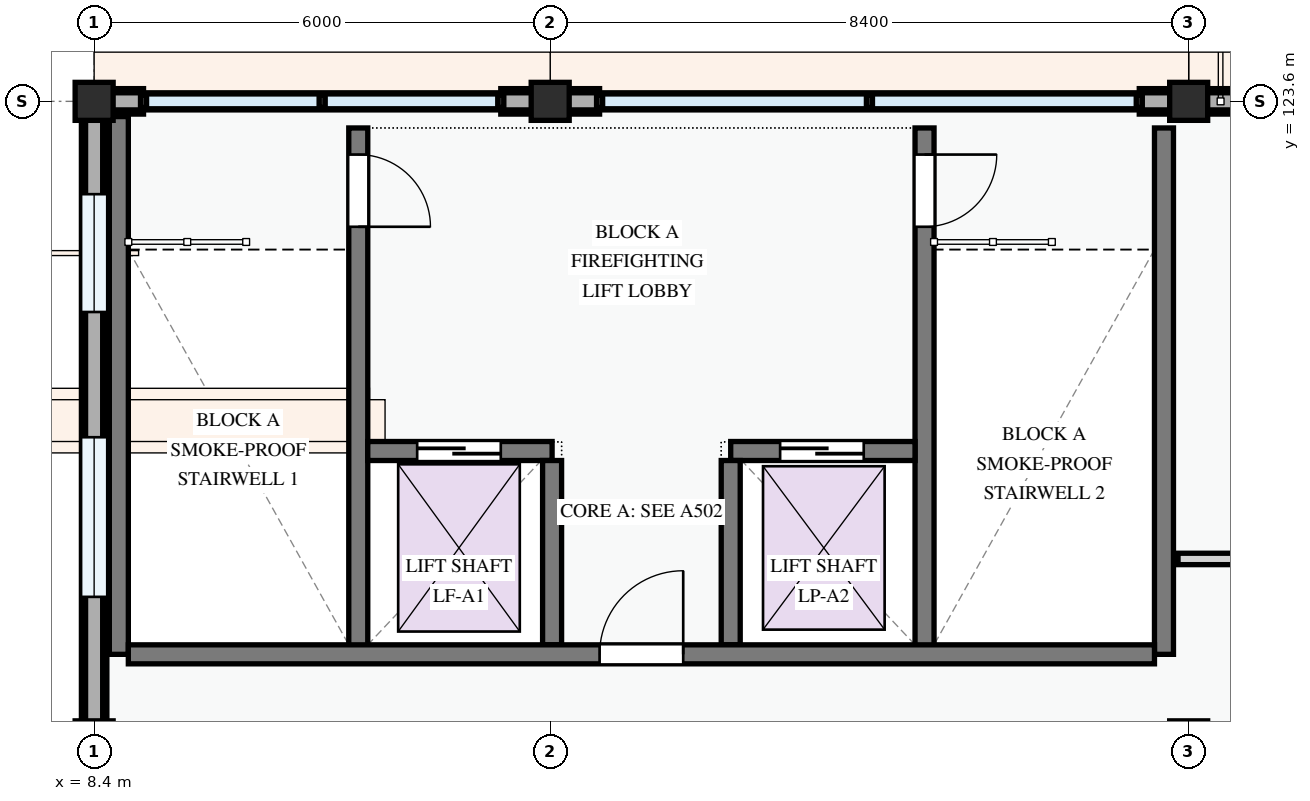
"""IFC4 building model, lengths in metres.
Left out: names, types, materials, properties, quantities, classifications, styles, units other than length and angle.
Written with IfcOpenShell. Run it as: python <this file> out.ifc"""

import sys

from ifc_helpers import new_model, si_unit, direction, frame, frame_2d, origin, origin_2d, place, context, subcontext, project, spatial, polyline, rectangle, outline, extrude, element, fill, save


model = new_model("IFC4")
c1 = context("Model", 3, precision=1e-05, world=origin(), true_north=direction((0.0, 1.0)))
c2 = subcontext(c1, "Body", "Model", "MODEL_VIEW")
j1 = project(units=[si_unit("LENGTHUNIT", "METRE"), si_unit("PLANEANGLEUNIT", "RADIAN")], contexts=[c1])
p1 = place(None, origin())
s1 = spatial("IfcSite", under=j1, at=p1, CompositionType="ELEMENT")
p2 = place(p1, origin())
s2 = spatial("IfcBuilding", under=s1, at=p2, CompositionType="ELEMENT")
p3 = place(p2, frame((0.0, 0.0, 51.0)))
s3 = spatial("IfcBuildingStorey", under=s2, at=p3, CompositionType="ELEMENT", Elevation=51.0)
for number, where, z_axis, x_axis in (
    (1, (8.4, 123.6, 0.0), (0.0, 0.0, 1.0), (1.0, 0.0, 0.0)),
    (2, (14.4, 123.6, 0.0), (0.0, 0.0, 1.0), (1.0, 0.0, 0.0)),
    (3, (22.8, 123.6, 0.0), (0.0, 0.0, 1.0), (1.0, 0.0, 0.0)),
):
    element("IfcColumn", number, at=place(p3, frame(where, z_axis=z_axis, x_axis=x_axis)), inside=s3, PredefinedType="COLUMN", context=c2, shape_type="SweptSolid", body=[
        extrude(rectangle(XDim=0.5, YDim=0.5, at=origin_2d()), origin(), (0.0, 0.0, 1.0), 3.3),
    ])
p4 = place(p3, frame((28.8, 123.6, 0.0), z_axis=(0.0, 0.0, 1.0), x_axis=(-1.0, 0.0, 0.0)))
e4 = element("IfcWall", 4, at=p4, inside=s3, PredefinedType="STANDARD", context=c2, shape_type="SweptSolid", body=[
    extrude(rectangle(XDim=6.0, YDim=0.335, at=frame_2d((3.0, 0.0))), origin(), (0.0, 0.0, 1.0), 2.545),
])
p5 = place(p4, frame((0.62, 0.0, 0.0)))
e5 = element("IfcOpeningElement", 5, at=p5, cuts=e4, PredefinedType="OPENING", context=c2, shape_type="SweptSolid", body=[
    extrude(rectangle(XDim=1.3, YDim=2.15, at=frame_2d((0.65, 1.075))), frame((0.0, 0.177, 0.0), z_axis=(0.0, -1.0, 0.0), x_axis=(1.0, 0.0, 0.0)), (0.0, 0.0, 1.0), 0.355),
])
p6 = place(p4, frame((3.29, 0.0, 0.78)))
e6 = element("IfcOpeningElement", 6, at=p6, cuts=e4, PredefinedType="OPENING", context=c2, shape_type="SweptSolid", body=[
    extrude(rectangle(XDim=1.2, YDim=1.35, at=frame_2d((0.6, 0.675))), frame((0.0, 0.177, 0.0), z_axis=(0.0, -1.0, 0.0), x_axis=(1.0, 0.0, 0.0)), (0.0, 0.0, 1.0), 0.355),
])
for number, where, z_axis, x_axis in (
    (7, (22.8, 123.6, 0.0), (0.0, 0.0, 1.0), (-1.0, 0.0, 0.0)),
    (8, (15.05, 123.6, 0.0), (0.0, 0.0, 1.0), (-1.0, 0.0, 0.0)),
):
    element("IfcWall", number, at=place(p3, frame(where, z_axis=z_axis, x_axis=x_axis)), inside=s3, PredefinedType="STANDARD", context=c2, shape_type="SweptSolid", body=[
        extrude(rectangle(XDim=0.65, YDim=0.335, at=frame_2d((0.325, 0.0))), origin(), (0.0, 0.0, 1.0), 3.06),
    ])
p7 = place(p3, frame((14.4, 123.6, 0.0), z_axis=(0.0, 0.0, 1.0), x_axis=(-1.0, 0.0, 0.0)))
e9 = element("IfcWall", 9, at=p7, inside=s3, PredefinedType="STANDARD", context=c2, shape_type="SweptSolid", body=[
    extrude(rectangle(XDim=0.65, YDim=0.335, at=frame_2d((0.325, 0.0))), origin(), (0.0, 0.0, 1.0), 3.06),
])
p8 = place(p3, frame((9.05, 123.6, 0.0), z_axis=(0.0, 0.0, 1.0), x_axis=(-1.0, 0.0, 0.0)))
e10 = element("IfcWall", 10, at=p8, inside=s3, PredefinedType="STANDARD", context=c2, shape_type="SweptSolid", body=[
    extrude(rectangle(XDim=0.48, YDim=0.335, at=frame_2d((0.24, 0.0))), origin(), (0.0, 0.0, 1.0), 3.06),
])
p9 = place(p3, frame((8.4, 123.6, 0.0), z_axis=(0.0, 0.0, 1.0), x_axis=(0.0, -1.0, 0.0)))
e11 = element("IfcWall", 11, at=p9, inside=s3, PredefinedType="STANDARD", context=c2, shape_type="SweptSolid", body=[
    extrude(rectangle(XDim=8.4, YDim=0.335, at=frame_2d((4.2, 0.0))), origin(), (0.0, 0.0, 1.0), 2.445),
])
p10 = place(p9, frame((1.221, 0.0, 0.78)))
e12 = element("IfcOpeningElement", 12, at=p10, cuts=e11, PredefinedType="OPENING", context=c2, shape_type="SweptSolid", body=[
    extrude(rectangle(XDim=1.55, YDim=1.4, at=frame_2d((0.775, 0.7))), frame((0.0, 0.177, 0.0), z_axis=(0.0, -1.0, 0.0), x_axis=(1.0, 0.0, 0.0)), (0.0, 0.0, 1.0), 0.355),
])
p11 = place(p9, frame((4.419, 0.0, 0.78)))
e13 = element("IfcOpeningElement", 13, at=p11, cuts=e11, PredefinedType="OPENING", context=c2, shape_type="SweptSolid", body=[
    extrude(rectangle(XDim=2.1, YDim=1.55, at=frame_2d((1.05, 0.775))), frame((0.0, 0.177, 0.0), z_axis=(0.0, -1.0, 0.0), x_axis=(1.0, 0.0, 0.0)), (0.0, 0.0, 1.0), 0.355),
])
p12 = place(p3, frame((28.8, 123.6, 3.3), z_axis=(0.0, 0.0, 1.0), x_axis=(-1.0, 0.0, 0.0)))
e14 = element("IfcWall", 14, at=p12, inside=s3, PredefinedType="PARAPET", context=c2, shape_type="SweptSolid", body=[
    extrude(outline(polyline([(0.0, 0.0), (6.0, 0.0), (6.0, 1.12), (5.5, 1.322), (5.0, 1.484), (4.5, 1.618), (4.0, 1.717), (3.5, 1.779), (3.0, 1.8), (2.5, 1.779), (2.0, 1.717), (1.5, 1.618), (1.0, 1.484), (0.5, 1.322), (0.0, 1.12), (0.0, 0.0)])), frame((0.0, 0.113, 0.0), z_axis=(0.0, -1.0, 0.0), x_axis=(1.0, 0.0, 0.0)), (0.0, 0.0, 1.0), 0.225),
])
p13 = place(p3, frame((22.8, 123.6, 3.3), z_axis=(0.0, 0.0, 1.0), x_axis=(-1.0, 0.0, 0.0)))
e15 = element("IfcWall", 15, at=p13, inside=s3, PredefinedType="PARAPET", context=c2, shape_type="SweptSolid", body=[
    extrude(outline(polyline([(0.0, 0.0), (8.4, 0.0), (8.4, 1.12), (7.7, 1.322), (7.0, 1.484), (6.3, 1.618), (5.6, 1.717), (4.9, 1.779), (4.2, 1.8), (3.5, 1.779), (2.8, 1.717), (2.1, 1.618), (1.4, 1.484), (0.7, 1.322), (0.0, 1.12), (0.0, 0.0)])), frame((0.0, 0.113, 0.0), z_axis=(0.0, -1.0, 0.0), x_axis=(1.0, 0.0, 0.0)), (0.0, 0.0, 1.0), 0.225),
])
p14 = place(p3, frame((14.4, 123.6, 3.3), z_axis=(0.0, 0.0, 1.0), x_axis=(-1.0, 0.0, 0.0)))
e16 = element("IfcWall", 16, at=p14, inside=s3, PredefinedType="PARAPET", context=c2, shape_type="SweptSolid", body=[
    extrude(outline(polyline([(0.0, 0.0), (6.0, 0.0), (6.0, 1.12), (5.5, 1.322), (5.0, 1.484), (4.5, 1.618), (4.0, 1.717), (3.5, 1.779), (3.0, 1.8), (2.5, 1.779), (2.0, 1.717), (1.5, 1.618), (1.0, 1.484), (0.5, 1.322), (0.0, 1.12), (0.0, 0.0)])), frame((0.0, 0.113, 0.0), z_axis=(0.0, -1.0, 0.0), x_axis=(1.0, 0.0, 0.0)), (0.0, 0.0, 1.0), 0.225),
])
p15 = place(p3, frame((8.4, 123.6, 3.3), z_axis=(0.0, 0.0, 1.0), x_axis=(0.0, -1.0, 0.0)))
e17 = element("IfcWall", 17, at=p15, inside=s3, PredefinedType="PARAPET", context=c2, shape_type="SweptSolid", body=[
    extrude(outline(polyline([(0.0, 0.0), (8.4, 0.0), (8.4, 1.12), (7.7, 1.322), (7.0, 1.484), (6.3, 1.618), (5.6, 1.717), (4.9, 1.779), (4.2, 1.8), (3.5, 1.779), (2.8, 1.717), (2.1, 1.618), (1.4, 1.484), (0.7, 1.322), (0.0, 1.12), (0.0, 0.0)])), frame((0.0, 0.113, 0.0), z_axis=(0.0, -1.0, 0.0), x_axis=(1.0, 0.0, 0.0)), (0.0, 0.0, 1.0), 0.225),
])
p16 = place(p3, frame((11.875, 123.25, 0.0), z_axis=(0.0, 0.0, 1.0), x_axis=(0.0, -1.0, 0.0)))
e18 = element("IfcWall", 18, at=p16, inside=s3, PredefinedType="SHEAR", context=c2, shape_type="SweptSolid", body=[
    extrude(rectangle(XDim=6.925, YDim=0.25, at=frame_2d((3.462, 0.0))), origin(), (0.0, 0.0, 1.0), 3.0),
])
p17 = place(p16, frame((0.35, 0.0, 0.0)))
e19 = element("IfcOpeningElement", 19, at=p17, cuts=e18, PredefinedType="OPENING", context=c2, shape_type="SweptSolid", body=[
    extrude(rectangle(XDim=0.95, YDim=2.1, at=frame_2d((0.475, 1.05))), frame((0.0, 0.135, 0.0), z_axis=(0.0, -1.0, 0.0), x_axis=(1.0, 0.0, 0.0)), (0.0, 0.0, 1.0), 0.27),
])
p18 = place(p3, frame((8.725, 123.4, 0.0), z_axis=(0.0, 0.0, 1.0), x_axis=(0.0, -1.0, 0.0)))
e20 = element("IfcWall", 20, at=p18, inside=s3, PredefinedType="SHEAR", context=c2, shape_type="SweptSolid", body=[
    extrude(rectangle(XDim=7.075, YDim=0.25, at=frame_2d((3.538, 0.0))), origin(), (0.0, 0.0, 1.0), 3.0),
])
p19 = place(p3, frame((22.475, 123.25, 0.0), z_axis=(0.0, 0.0, 1.0), x_axis=(0.0, -1.0, 0.0)))
e21 = element("IfcWall", 21, at=p19, inside=s3, PredefinedType="SHEAR", context=c2, shape_type="SweptSolid", body=[
    extrude(rectangle(XDim=6.925, YDim=0.25, at=frame_2d((3.462, 0.0))), origin(), (0.0, 0.0, 1.0), 3.0),
])
p20 = place(p3, frame((19.325, 123.25, 0.0), z_axis=(0.0, 0.0, 1.0), x_axis=(0.0, -1.0, 0.0)))
e22 = element("IfcWall", 22, at=p20, inside=s3, PredefinedType="SHEAR", context=c2, shape_type="SweptSolid", body=[
    extrude(rectangle(XDim=6.925, YDim=0.25, at=frame_2d((3.462, 0.0))), origin(), (0.0, 0.0, 1.0), 3.0),
])
p21 = place(p20, frame((0.35, 0.0, 0.0)))
e23 = element("IfcOpeningElement", 23, at=p21, cuts=e22, PredefinedType="OPENING", context=c2, shape_type="SweptSolid", body=[
    extrude(rectangle(XDim=0.95, YDim=2.1, at=frame_2d((0.475, 1.05))), frame((0.0, 0.135, 0.0), z_axis=(0.0, -1.0, 0.0), x_axis=(1.0, 0.0, 0.0)), (0.0, 0.0, 1.0), 0.27),
])
p22 = place(p3, frame((12.0, 119.0, 0.0), z_axis=(0.0, 0.0, 1.0), x_axis=(1.0, 0.0, 0.0)))
e24 = element("IfcWall", 24, at=p22, inside=s3, PredefinedType="SHEAR", context=c2, shape_type="SweptSolid", body=[
    extrude(rectangle(XDim=2.425, YDim=0.25, at=frame_2d((1.212, 0.0))), origin(), (0.0, 0.0, 1.0), 3.0),
])
p23 = place(p22, frame((0.65, 0.0, 0.0)))
e25 = element("IfcOpeningElement", 25, at=p23, cuts=e24, PredefinedType="OPENING", context=c2, shape_type="SweptSolid", body=[
    extrude(rectangle(XDim=1.1, YDim=2.15, at=frame_2d((0.55, 1.075))), frame((0.0, 0.135, 0.0), z_axis=(0.0, -1.0, 0.0), x_axis=(1.0, 0.0, 0.0)), (0.0, 0.0, 1.0), 0.27),
])
p24 = place(p3, frame((16.775, 119.0, 0.0), z_axis=(0.0, 0.0, 1.0), x_axis=(1.0, 0.0, 0.0)))
e26 = element("IfcWall", 26, at=p24, inside=s3, PredefinedType="SHEAR", context=c2, shape_type="SweptSolid", body=[
    extrude(rectangle(XDim=2.425, YDim=0.25, at=frame_2d((1.212, 0.0))), origin(), (0.0, 0.0, 1.0), 3.0),
])
p25 = place(p24, frame((0.65, 0.0, 0.0)))
e27 = element("IfcOpeningElement", 27, at=p25, cuts=e26, PredefinedType="OPENING", context=c2, shape_type="SweptSolid", body=[
    extrude(rectangle(XDim=1.1, YDim=2.15, at=frame_2d((0.55, 1.075))), frame((0.0, 0.135, 0.0), z_axis=(0.0, -1.0, 0.0), x_axis=(1.0, 0.0, 0.0)), (0.0, 0.0, 1.0), 0.27),
])
for number, where, z_axis, x_axis in (
    (28, (14.425, 118.875, 0.0), (0.0, 0.0, 1.0), (0.0, -1.0, 0.0)),
    (29, (16.775, 118.875, 0.0), (0.0, 0.0, 1.0), (0.0, -1.0, 0.0)),
):
    element("IfcWall", number, at=place(p3, frame(where, z_axis=z_axis, x_axis=x_axis)), inside=s3, PredefinedType="SHEAR", context=c2, shape_type="SweptSolid", body=[
        extrude(rectangle(XDim=2.425, YDim=0.25, at=frame_2d((1.212, 0.0))), origin(), (0.0, 0.0, 1.0), 3.0),
    ])
p26 = place(p3, frame((8.85, 116.325, 0.0), z_axis=(0.0, 0.0, 1.0), x_axis=(1.0, 0.0, 0.0)))
e30 = element("IfcWall", 30, at=p26, inside=s3, PredefinedType="SHEAR", context=c2, shape_type="SweptSolid", body=[
    extrude(rectangle(XDim=13.5, YDim=0.25, at=frame_2d((6.75, 0.0))), origin(), (0.0, 0.0, 1.0), 3.0),
])
p27 = place(p26, frame((6.2, 0.0, 0.0)))
e31 = element("IfcOpeningElement", 31, at=p27, cuts=e30, PredefinedType="OPENING", context=c2, shape_type="SweptSolid", body=[
    extrude(rectangle(XDim=1.1, YDim=2.15, at=frame_2d((0.55, 1.075))), frame((0.0, 0.135, 0.0), z_axis=(0.0, -1.0, 0.0), x_axis=(1.0, 0.0, 0.0)), (0.0, 0.0, 1.0), 0.27),
])
p28 = place(p3, frame((22.66, 117.58, 0.0), z_axis=(0.0, 0.0, 1.0), x_axis=(1.0, 0.0, 0.0)))
e32 = element("IfcWall", 32, at=p28, inside=s3, PredefinedType="PARTITIONING", context=c2, shape_type="SweptSolid", body=[
    extrude(rectangle(XDim=14.48, YDim=0.15, at=frame_2d((7.24, 0.0))), origin(), (0.0, 0.0, 1.0), 3.0),
])
p29 = place(p28, frame((2.74, 0.0, 0.0)))
e33 = element("IfcOpeningElement", 33, at=p29, cuts=e32, PredefinedType="OPENING", context=c2, shape_type="SweptSolid", body=[
    extrude(rectangle(XDim=0.96, YDim=2.12, at=frame_2d((0.48, 1.06))), frame((0.0, 0.085, 0.0), z_axis=(0.0, -1.0, 0.0), x_axis=(1.0, 0.0, 0.0)), (0.0, 0.0, 1.0), 0.17),
])
p30 = place(p10, origin())
e34 = element("IfcWindow", 34, at=p30, inside=s3, PartitioningType="SINGLE_PANEL", PredefinedType="WINDOW", context=c2, shape_type="SweptSolid", body=[
    extrude(rectangle(XDim=1.55, YDim=1.4, at=frame_2d((0.775, 0.7))), frame((0.0, 0.03, 0.0), z_axis=(0.0, -1.0, 0.0), x_axis=(1.0, 0.0, 0.0)), (0.0, 0.0, 1.0), 0.06),
])
fill(e12, e34)
p31 = place(p11, origin())
e35 = element("IfcWindow", 35, at=p31, inside=s3, PartitioningType="DOUBLE_PANEL_VERTICAL", PredefinedType="WINDOW", context=c2, shape_type="SweptSolid", body=[
    extrude(rectangle(XDim=2.1, YDim=1.55, at=frame_2d((1.05, 0.775))), frame((0.0, 0.03, 0.0), z_axis=(0.0, -1.0, 0.0), x_axis=(1.0, 0.0, 0.0)), (0.0, 0.0, 1.0), 0.06),
])
fill(e13, e35)
p32 = place(p17, origin())
e36 = element("IfcDoor", 36, at=p32, inside=s3, OperationType="SINGLE_SWING_RIGHT", PredefinedType="DOOR", context=c2, shape_type="SweptSolid", body=[
    extrude(rectangle(XDim=0.95, YDim=2.1, at=frame_2d((0.475, 1.05))), frame((0.0, 0.025, 0.0), z_axis=(0.0, -1.0, 0.0), x_axis=(1.0, 0.0, 0.0)), (0.0, 0.0, 1.0), 0.05),
])
fill(e19, e36)
p33 = place(p21, origin())
e37 = element("IfcDoor", 37, at=p33, inside=s3, OperationType="SINGLE_SWING_LEFT", PredefinedType="DOOR", context=c2, shape_type="SweptSolid", body=[
    extrude(rectangle(XDim=0.95, YDim=2.1, at=frame_2d((0.475, 1.05))), frame((0.0, 0.025, 0.0), z_axis=(0.0, -1.0, 0.0), x_axis=(1.0, 0.0, 0.0)), (0.0, 0.0, 1.0), 0.05),
])
fill(e23, e37)
p34 = place(p23, origin())
e38 = element("IfcDoor", 38, at=p34, inside=s3, OperationType="SLIDING_TO_LEFT", PredefinedType="DOOR", context=c2, shape_type="SweptSolid", body=[
    extrude(rectangle(XDim=1.1, YDim=2.15, at=frame_2d((0.55, 1.075))), frame((0.0, 0.025, 0.0), z_axis=(0.0, -1.0, 0.0), x_axis=(1.0, 0.0, 0.0)), (0.0, 0.0, 1.0), 0.05),
])
fill(e25, e38)
p35 = place(p25, origin())
e39 = element("IfcDoor", 39, at=p35, inside=s3, OperationType="SLIDING_TO_LEFT", PredefinedType="DOOR", context=c2, shape_type="SweptSolid", body=[
    extrude(rectangle(XDim=1.1, YDim=2.15, at=frame_2d((0.55, 1.075))), frame((0.0, 0.025, 0.0), z_axis=(0.0, -1.0, 0.0), x_axis=(1.0, 0.0, 0.0)), (0.0, 0.0, 1.0), 0.05),
])
fill(e27, e39)
p36 = place(p27, origin())
e40 = element("IfcDoor", 40, at=p36, inside=s3, OperationType="SINGLE_SWING_RIGHT", PredefinedType="DOOR", context=c2, shape_type="SweptSolid", body=[
    extrude(rectangle(XDim=1.1, YDim=2.15, at=frame_2d((0.55, 1.075))), frame((0.0, 0.025, 0.0), z_axis=(0.0, -1.0, 0.0), x_axis=(1.0, 0.0, 0.0)), (0.0, 0.0, 1.0), 0.05),
])
fill(e31, e40)
save(model, sys.argv[1])
